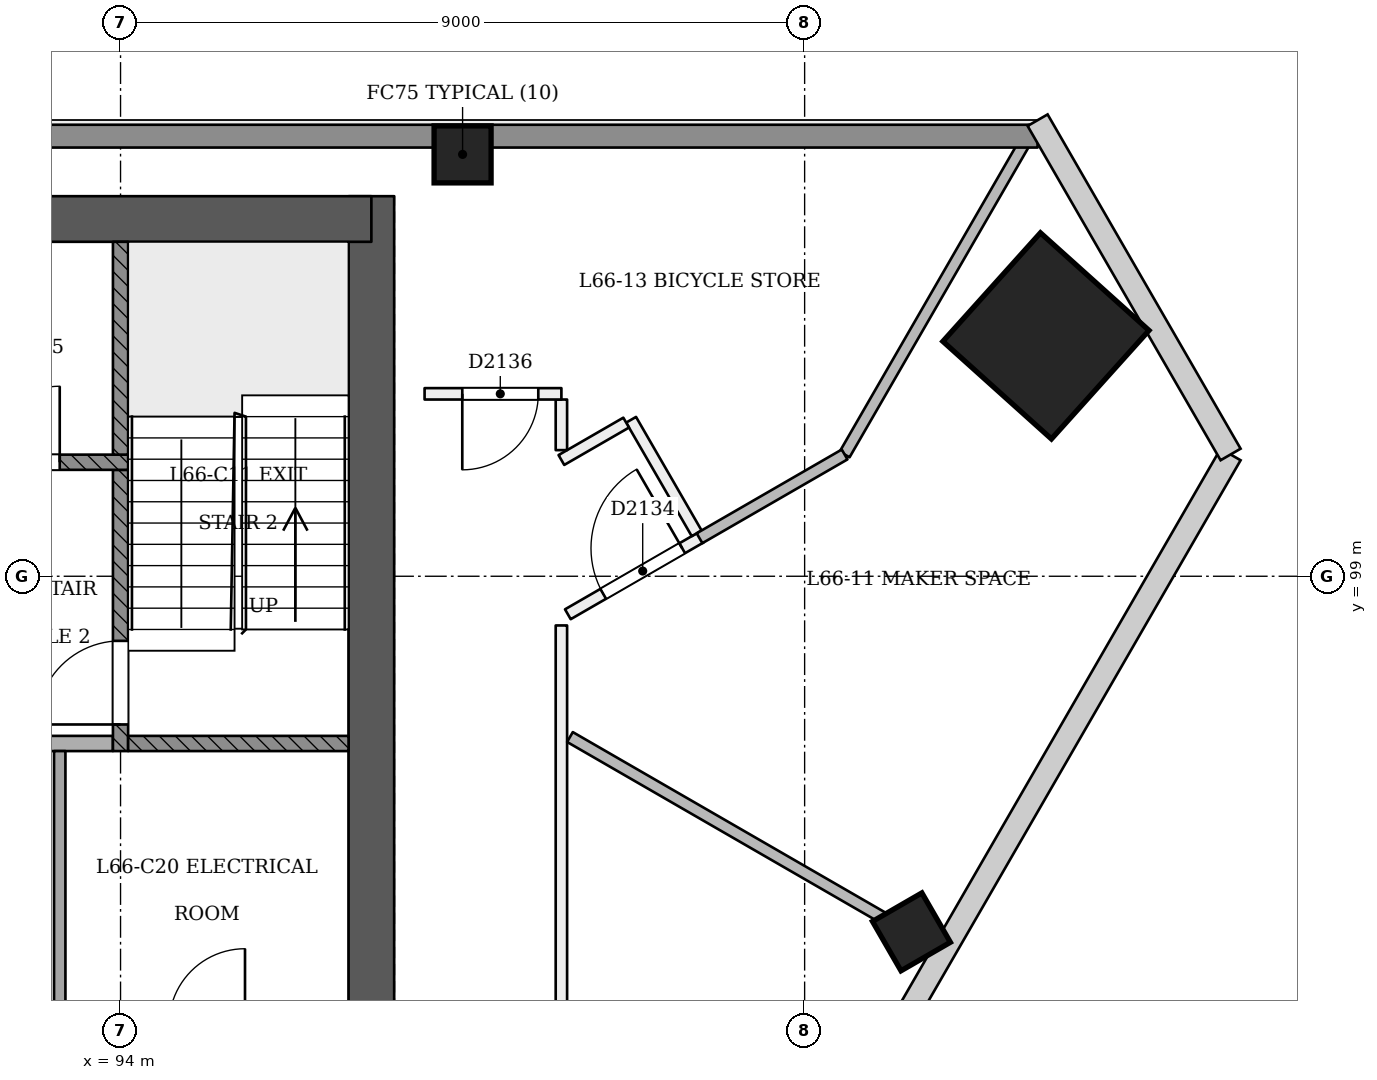
"""IFC4 building model, lengths in metres.
Left out: names, types, materials, properties, quantities, classifications, styles, units other than length and angle.
Written with IfcOpenShell. Run it as: python <this file> out.ifc"""

import sys

from ifc_helpers import new_model, si_unit, direction, frame, frame_2d, origin, origin_2d, place, context, subcontext, project, spatial, rectangle, extrude, element, fill, save


model = new_model("IFC4")
c1 = context("Model", 3, precision=1e-05, world=origin(), true_north=direction((0.0, 1.0)))
c2 = subcontext(c1, "Body", "Model", "MODEL_VIEW")
j1 = project(units=[si_unit("LENGTHUNIT", "METRE"), si_unit("PLANEANGLEUNIT", "RADIAN")], contexts=[c1])
p1 = place(None, origin())
s1 = spatial("IfcSite", under=j1, at=p1, CompositionType="ELEMENT")
p2 = place(p1, origin())
s2 = spatial("IfcBuilding", under=s1, at=p2, CompositionType="ELEMENT")
p3 = place(p2, frame((0.0, 0.0, 257.2)))
s3 = spatial("IfcBuildingStorey", under=s2, at=p3, CompositionType="ELEMENT", Elevation=257.2)
p4 = place(p3, frame((97.3, 93.1, 0.0), z_axis=(0.0, 0.0, 1.0), x_axis=(0.0, 1.0, 0.0)))
e1 = element("IfcWall", 1, at=p4, inside=s3, PredefinedType="SHEAR", context=c2, shape_type="SweptSolid", body=[
    extrude(rectangle(XDim=10.9, YDim=0.6, at=frame_2d((5.45, 0.0))), origin(), (0.0, 0.0, 1.0), 3.6),
])
p5 = place(p3, frame((97.3, 103.7, 0.0), z_axis=(0.0, 0.0, 1.0), x_axis=(-1.0, 0.0, 0.0)))
e2 = element("IfcWall", 2, at=p5, inside=s3, PredefinedType="SHEAR", context=c2, shape_type="SweptSolid", body=[
    extrude(rectangle(XDim=24.9, YDim=0.6, at=frame_2d((12.45, 0.0))), origin(), (0.0, 0.0, 1.0), 3.6),
])
p6 = place(p3, frame((106.209, 102.151, 0.0), z_axis=(-0.028401814599, 0.009218727412, 0.999554076572), x_axis=(0.500747338873, -0.865308534207, 0.022209080133)))
e3 = element("IfcColumn", 3, at=p6, inside=s3, PredefinedType="COLUMN", context=c2, shape_type="SweptSolid", body=[
    extrude(rectangle(XDim=1.92, YDim=1.92, at=origin_2d()), origin(), (0.0, 0.0, 1.0), 3.602),
])
p7 = place(p3, frame((98.5, 104.55, 0.0), z_axis=(0.0, 0.0, 1.0), x_axis=(1.0, 0.0, 0.0)))
e4 = element("IfcColumn", 4, at=p7, inside=s3, PredefinedType="COLUMN", context=c2, shape_type="SweptSolid", body=[
    extrude(rectangle(XDim=0.75, YDim=0.75, at=origin_2d()), origin(), (0.0, 0.0, 1.0), 3.6),
])
p8 = place(p3, frame((104.432, 94.275, -0.023), z_axis=(-0.022153634206, 0.038480930364, 0.999013730882), x_axis=(-0.501317534198, -0.86497852137, 0.022201069202)))
e5 = element("IfcColumn", 5, at=p8, inside=s3, PredefinedType="COLUMN", context=c2, shape_type="SweptSolid", body=[
    extrude(rectangle(XDim=0.75, YDim=0.75, at=origin_2d()), origin(), (0.0, 0.0, 1.0), 3.604),
])
p9 = place(p3, frame((99.8, 90.6, 0.0), z_axis=(0.0, 0.0, 1.0), x_axis=(0.0, 1.0, 0.0)))
e6 = element("IfcWall", 6, at=p9, inside=s3, PredefinedType="PARTITIONING", context=c2, shape_type="SweptSolid", body=[
    extrude(rectangle(XDim=7.753, YDim=0.15, at=frame_2d((3.876, 0.0))), origin(), (0.0, 0.0, 1.0), 3.2),
])
p10 = place(p9, frame((0.251, 0.0, 0.0)))
e7 = element("IfcOpeningElement", 7, at=p10, cuts=e6, PredefinedType="OPENING", context=c2, shape_type="SweptSolid", body=[
    extrude(rectangle(XDim=1.2, YDim=2.1, at=frame_2d((0.6, 1.05))), frame((0.0, 0.085, 0.0), z_axis=(0.0, -1.0, 0.0), x_axis=(1.0, 0.0, 0.0)), (0.0, 0.0, 1.0), 0.171),
])
p11 = place(p3, frame((99.885, 98.5, 0.0), z_axis=(0.0, 0.0, 1.0), x_axis=(0.866010470582, 0.500025864173, 0.0)))
e8 = element("IfcWall", 8, at=p11, inside=s3, PredefinedType="PARTITIONING", context=c2, shape_type="SweptSolid", body=[
    extrude(rectangle(XDim=2.02, YDim=0.15, at=frame_2d((1.01, 0.0))), origin(), (0.0, 0.0, 1.0), 3.2),
])
p12 = place(p11, frame((0.537, 0.0, 0.0)))
e9 = element("IfcOpeningElement", 9, at=p12, cuts=e8, PredefinedType="OPENING", context=c2, shape_type="SweptSolid", body=[
    extrude(rectangle(XDim=1.2, YDim=2.1, at=frame_2d((0.6, 1.05))), frame((0.0, 0.085, 0.0), z_axis=(0.0, -1.0, 0.0), x_axis=(1.0, 0.0, 0.0)), (0.0, 0.0, 1.0), 0.171),
])
p13 = place(p3, frame((101.58, 99.565, 0.0), z_axis=(0.0, 0.0, 1.0), x_axis=(-0.500020560727, 0.866013532718, 0.0)))
e10 = element("IfcWall", 10, at=p13, inside=s3, PredefinedType="PARTITIONING", context=c2, shape_type="SweptSolid", body=[
    extrude(rectangle(XDim=1.725, YDim=0.15, at=frame_2d((0.863, 0.0))), origin(), (0.0, 0.0, 1.0), 3.2),
])
p14 = place(p3, frame((100.652, 101.021, 0.0), z_axis=(0.0, 0.0, 1.0), x_axis=(-0.866020293397, -0.500008851346, 0.0)))
e11 = element("IfcWall", 11, at=p14, inside=s3, PredefinedType="PARTITIONING", context=c2, shape_type="SweptSolid", body=[
    extrude(rectangle(XDim=0.984, YDim=0.15, at=frame_2d((0.492, 0.0))), origin(), (0.0, 0.0, 1.0), 3.2),
])
p15 = place(p3, frame((99.8, 100.659, 0.0), z_axis=(0.0, 0.0, 1.0), x_axis=(0.0, 1.0, 0.0)))
e12 = element("IfcWall", 12, at=p15, inside=s3, PredefinedType="PARTITIONING", context=c2, shape_type="SweptSolid", body=[
    extrude(rectangle(XDim=0.666, YDim=0.15, at=frame_2d((0.333, 0.0))), origin(), (0.0, 0.0, 1.0), 3.2),
])
p16 = place(p3, frame((99.8, 101.4, 0.0), z_axis=(0.0, 0.0, 1.0), x_axis=(-1.0, 0.0, 0.0)))
e13 = element("IfcWall", 13, at=p16, inside=s3, PredefinedType="PARTITIONING", context=c2, shape_type="SweptSolid", body=[
    extrude(rectangle(XDim=1.8, YDim=0.15, at=frame_2d((0.9, 0.0))), origin(), (0.0, 0.0, 1.0), 3.2),
])
p17 = place(p16, frame((0.304, 0.0, 0.0)))
e14 = element("IfcOpeningElement", 14, at=p17, cuts=e13, PredefinedType="OPENING", context=c2, shape_type="SweptSolid", body=[
    extrude(rectangle(XDim=1.0, YDim=2.1, at=frame_2d((0.5, 1.05))), frame((0.0, 0.085, 0.0), z_axis=(0.0, -1.0, 0.0), x_axis=(1.0, 0.0, 0.0)), (0.0, 0.0, 1.0), 0.171),
])
p18 = place(p3, frame((104.735, 94.101, 0.0), z_axis=(0.0, 0.0, 1.0), x_axis=(-0.866032995015, 0.499986851372, 0.0)))
e15 = element("IfcWall", 15, at=p18, inside=s3, PredefinedType="PARTITIONING", context=c2, shape_type="SweptSolid", body=[
    extrude(rectangle(XDim=5.569, YDim=0.15, at=frame_2d((2.784, 0.0))), origin(), (0.0, 0.0, 1.0), 2.7),
])
p19 = place(p3, frame((106.007, 104.9, 0.0), z_axis=(0.0, 0.0, 1.0), x_axis=(-0.500012022864, -0.866018462269, 0.0)))
e16 = element("IfcWall", 16, at=p19, inside=s3, PredefinedType="PARTITIONING", context=c2, shape_type="SweptSolid", body=[
    extrude(rectangle(XDim=4.963, YDim=0.15, at=frame_2d((2.481, 0.0))), origin(), (0.0, 0.0, 1.0), 2.7),
])
p20 = place(p3, frame((103.526, 100.602, 0.0), z_axis=(0.0, 0.0, 1.0), x_axis=(-0.866039875853, -0.499974932805, 0.0)))
e17 = element("IfcWall", 17, at=p20, inside=s3, PredefinedType="PARTITIONING", context=c2, shape_type="SweptSolid", body=[
    extrude(rectangle(XDim=2.204, YDim=0.15, at=frame_2d((1.102, 0.0))), origin(), (0.0, 0.0, 1.0), 3.2),
])
p21 = place(p3, frame((63.935, 104.79, 0.0), z_axis=(0.0, 0.0, 1.0), x_axis=(1.0, 0.0, 0.0)))
e18 = element("IfcWall", 18, at=p21, inside=s3, PredefinedType="SOLIDWALL", context=c2, shape_type="SweptSolid", body=[
    extrude(rectangle(XDim=42.13, YDim=0.3, at=frame_2d((21.065, 0.0))), origin(), (0.0, 0.0, 1.0), 2.7),
])
p22 = place(p3, frame((93.2, 93.4, 0.0), z_axis=(0.0, 0.0, 1.0), x_axis=(0.0, 1.0, 0.0)))
e19 = element("IfcWall", 19, at=p22, inside=s3, PredefinedType="PARTITIONING", context=c2, shape_type="SweptSolid", body=[
    extrude(rectangle(XDim=3.3, YDim=0.15, at=frame_2d((1.65, 0.0))), origin(), (0.0, 0.0, 1.0), 3.2),
])
p23 = place(p3, frame((91.5, 96.8, 0.0), z_axis=(0.0, 0.0, 1.0), x_axis=(1.0, 0.0, 0.0)))
e20 = element("IfcWall", 20, at=p23, inside=s3, PredefinedType="PARTITIONING", context=c2, shape_type="SweptSolid", body=[
    extrude(rectangle(XDim=2.4, YDim=0.2, at=frame_2d((1.2, 0.0))), origin(), (0.0, 0.0, 1.0), 3.2),
])
p24 = place(p3, frame((94.0, 96.7, 0.0), z_axis=(0.0, 0.0, 1.0), x_axis=(0.0, 1.0, 0.0)))
e21 = element("IfcWall", 21, at=p24, inside=s3, PredefinedType="SOLIDWALL", context=c2, shape_type="SweptSolid", body=[
    extrude(rectangle(XDim=3.7, YDim=0.2, at=frame_2d((1.85, 0.0))), origin(), (0.0, 0.0, 1.0), 3.2),
])
p25 = place(p24, frame((0.35, 0.0, 0.0)))
e22 = element("IfcOpeningElement", 22, at=p25, cuts=e21, PredefinedType="OPENING", context=c2, shape_type="SweptSolid", body=[
    extrude(rectangle(XDim=1.1, YDim=2.1, at=frame_2d((0.55, 1.05))), frame((0.0, 0.11, 0.0), z_axis=(0.0, -1.0, 0.0), x_axis=(1.0, 0.0, 0.0)), (0.0, 0.0, 1.0), 0.221),
])
p26 = place(p3, frame((94.1, 96.8, 0.0), z_axis=(0.0, 0.0, 1.0), x_axis=(1.0, 0.0, 0.0)))
e23 = element("IfcWall", 23, at=p26, inside=s3, PredefinedType="SOLIDWALL", context=c2, shape_type="SweptSolid", body=[
    extrude(rectangle(XDim=2.9, YDim=0.2, at=frame_2d((1.45, 0.0))), origin(), (0.0, 0.0, 1.0), 3.2),
])
p27 = place(p3, frame((75.9, 100.5, 0.0), z_axis=(0.0, 0.0, 1.0), x_axis=(1.0, 0.0, 0.0)))
e24 = element("IfcWall", 24, at=p27, inside=s3, PredefinedType="SOLIDWALL", context=c2, shape_type="SweptSolid", body=[
    extrude(rectangle(XDim=18.2, YDim=0.2, at=frame_2d((9.1, 0.0))), origin(), (0.0, 0.0, 1.0), 3.2),
])
p28 = place(p27, frame((2.6, 0.0, 0.0)))
e25 = element("IfcOpeningElement", 25, at=p28, cuts=e24, PredefinedType="OPENING", context=c2, shape_type="SweptSolid", body=[
    extrude(rectangle(XDim=1.1, YDim=2.1, at=frame_2d((0.55, 1.05))), frame((0.0, 0.11, 0.0), z_axis=(0.0, -1.0, 0.0), x_axis=(1.0, 0.0, 0.0)), (0.0, 0.0, 1.0), 0.221),
])
p29 = place(p27, frame((4.5, 0.0, 0.0)))
e26 = element("IfcOpeningElement", 26, at=p29, cuts=e24, PredefinedType="OPENING", context=c2, shape_type="SweptSolid", body=[
    extrude(rectangle(XDim=1.1, YDim=2.1, at=frame_2d((0.55, 1.05))), frame((0.0, 0.11, 0.0), z_axis=(0.0, -1.0, 0.0), x_axis=(1.0, 0.0, 0.0)), (0.0, 0.0, 1.0), 0.221),
])
p30 = place(p27, frame((6.4, 0.0, 0.0)))
e27 = element("IfcOpeningElement", 27, at=p30, cuts=e24, PredefinedType="OPENING", context=c2, shape_type="SweptSolid", body=[
    extrude(rectangle(XDim=1.1, YDim=2.1, at=frame_2d((0.55, 1.05))), frame((0.0, 0.11, 0.0), z_axis=(0.0, -1.0, 0.0), x_axis=(1.0, 0.0, 0.0)), (0.0, 0.0, 1.0), 0.221),
])
p31 = place(p27, frame((8.3, 0.0, 0.0)))
e28 = element("IfcOpeningElement", 28, at=p31, cuts=e24, PredefinedType="OPENING", context=c2, shape_type="SweptSolid", body=[
    extrude(rectangle(XDim=1.1, YDim=2.1, at=frame_2d((0.55, 1.05))), frame((0.0, 0.11, 0.0), z_axis=(0.0, -1.0, 0.0), x_axis=(1.0, 0.0, 0.0)), (0.0, 0.0, 1.0), 0.221),
])
p32 = place(p27, frame((10.2, 0.0, 0.0)))
e29 = element("IfcOpeningElement", 29, at=p32, cuts=e24, PredefinedType="OPENING", context=c2, shape_type="SweptSolid", body=[
    extrude(rectangle(XDim=1.1, YDim=2.1, at=frame_2d((0.55, 1.05))), frame((0.0, 0.11, 0.0), z_axis=(0.0, -1.0, 0.0), x_axis=(1.0, 0.0, 0.0)), (0.0, 0.0, 1.0), 0.221),
])
p33 = place(p27, frame((12.1, 0.0, 0.0)))
e30 = element("IfcOpeningElement", 30, at=p33, cuts=e24, PredefinedType="OPENING", context=c2, shape_type="SweptSolid", body=[
    extrude(rectangle(XDim=1.1, YDim=2.1, at=frame_2d((0.55, 1.05))), frame((0.0, 0.11, 0.0), z_axis=(0.0, -1.0, 0.0), x_axis=(1.0, 0.0, 0.0)), (0.0, 0.0, 1.0), 0.221),
])
p34 = place(p27, frame((14.0, 0.0, 0.0)))
e31 = element("IfcOpeningElement", 31, at=p34, cuts=e24, PredefinedType="OPENING", context=c2, shape_type="SweptSolid", body=[
    extrude(rectangle(XDim=1.1, YDim=2.1, at=frame_2d((0.55, 1.05))), frame((0.0, 0.11, 0.0), z_axis=(0.0, -1.0, 0.0), x_axis=(1.0, 0.0, 0.0)), (0.0, 0.0, 1.0), 0.221),
])
p35 = place(p27, frame((0.65, 0.0, 0.0)))
e32 = element("IfcOpeningElement", 32, at=p35, cuts=e24, PredefinedType="OPENING", context=c2, shape_type="SweptSolid", body=[
    extrude(rectangle(XDim=1.0, YDim=2.1, at=frame_2d((0.5, 1.05))), frame((0.0, 0.11, 0.0), z_axis=(0.0, -1.0, 0.0), x_axis=(1.0, 0.0, 0.0)), (0.0, 0.0, 1.0), 0.221),
])
p36 = place(p27, frame((16.3, 0.0, 0.0)))
e33 = element("IfcOpeningElement", 33, at=p36, cuts=e24, PredefinedType="OPENING", context=c2, shape_type="SweptSolid", body=[
    extrude(rectangle(XDim=1.0, YDim=2.1, at=frame_2d((0.5, 1.05))), frame((0.0, 0.11, 0.0), z_axis=(0.0, -1.0, 0.0), x_axis=(1.0, 0.0, 0.0)), (0.0, 0.0, 1.0), 0.221),
])
p37 = place(p3, frame((94.0, 100.6, 0.0), z_axis=(0.0, 0.0, 1.0), x_axis=(0.0, 1.0, 0.0)))
e34 = element("IfcWall", 34, at=p37, inside=s3, PredefinedType="SOLIDWALL", context=c2, shape_type="SweptSolid", body=[
    extrude(rectangle(XDim=2.8, YDim=0.2, at=frame_2d((1.4, 0.0))), origin(), (0.0, 0.0, 1.0), 3.2),
])
p38 = place(p12, origin())
e35 = element("IfcDoor", 35, at=p38, inside=s3, OperationType="SINGLE_SWING_RIGHT", PredefinedType="NOTDEFINED", context=c2, shape_type="SweptSolid", body=[
    extrude(rectangle(XDim=1.2, YDim=2.1, at=frame_2d((0.6, 1.05))), frame((0.0, 0.025, 0.0), z_axis=(0.0, -1.0, 0.0), x_axis=(1.0, 0.0, 0.0)), (0.0, 0.0, 1.0), 0.05),
])
fill(e9, e35)
p39 = place(p17, origin())
e36 = element("IfcDoor", 36, at=p39, inside=s3, OperationType="SINGLE_SWING_RIGHT", PredefinedType="NOTDEFINED", context=c2, shape_type="SweptSolid", body=[
    extrude(rectangle(XDim=1.0, YDim=2.1, at=frame_2d((0.5, 1.05))), frame((0.0, 0.025, 0.0), z_axis=(0.0, -1.0, 0.0), x_axis=(1.0, 0.0, 0.0)), (0.0, 0.0, 1.0), 0.05),
])
fill(e14, e36)
p40 = place(p25, origin())
e37 = element("IfcDoor", 37, at=p40, inside=s3, OperationType="SINGLE_SWING_LEFT", PredefinedType="NOTDEFINED", context=c2, shape_type="SweptSolid", body=[
    extrude(rectangle(XDim=1.1, YDim=2.1, at=frame_2d((0.55, 1.05))), frame((0.0, 0.025, 0.0), z_axis=(0.0, -1.0, 0.0), x_axis=(1.0, 0.0, 0.0)), (0.0, 0.0, 1.0), 0.05),
])
fill(e22, e37)
p41 = place(p36, origin())
e38 = element("IfcDoor", 38, at=p41, inside=s3, OperationType="SINGLE_SWING_RIGHT", PredefinedType="NOTDEFINED", context=c2, shape_type="SweptSolid", body=[
    extrude(rectangle(XDim=1.0, YDim=2.1, at=frame_2d((0.5, 1.05))), frame((0.0, 0.025, 0.0), z_axis=(0.0, -1.0, 0.0), x_axis=(1.0, 0.0, 0.0)), (0.0, 0.0, 1.0), 0.05),
])
fill(e33, e38)
save(model, sys.argv[1])
